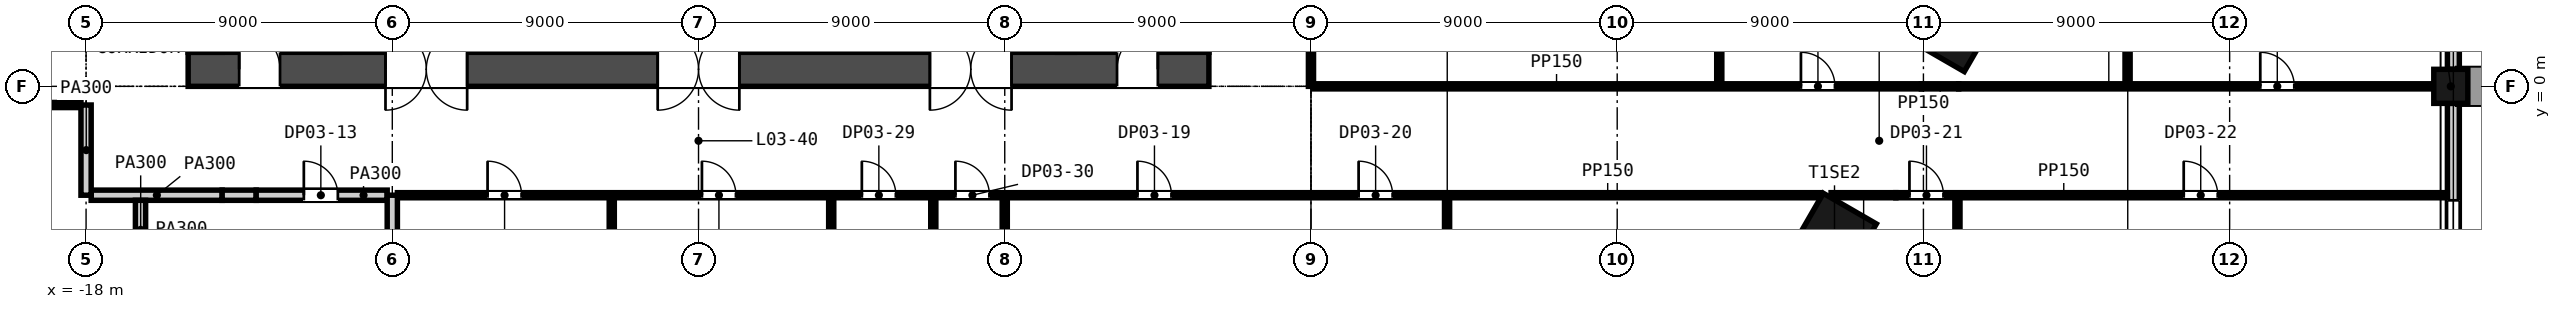
"""IFC4 building model, lengths in metres.
Left out: names, types, materials, properties, quantities, classifications, styles, units other than length and angle.
Written with IfcOpenShell. Run it as: python <this file> out.ifc"""

import sys

from ifc_helpers import new_model, si_unit, direction, frame, frame_2d, origin, origin_2d, place, context, subcontext, project, spatial, rectangle, extrude, element, fill, save


model = new_model("IFC4")
c1 = context("Model", 3, precision=1e-05, world=origin(), true_north=direction((0.0, 1.0)))
c2 = subcontext(c1, "Body", "Model", "MODEL_VIEW")
j1 = project(units=[si_unit("LENGTHUNIT", "METRE"), si_unit("PLANEANGLEUNIT", "RADIAN")], contexts=[c1])
p1 = place(None, origin())
s1 = spatial("IfcSite", under=j1, at=p1, CompositionType="ELEMENT")
p2 = place(p1, origin())
s2 = spatial("IfcBuilding", under=s1, at=p2, CompositionType="ELEMENT")
p3 = place(p2, frame((0.0, 0.0, 22.5)))
s3 = spatial("IfcBuildingStorey", under=s2, at=p3, CompositionType="ELEMENT", Elevation=22.5)
p4 = place(p3, frame((-15.0, 0.5, -0.3), z_axis=(0.0, 0.0, 1.0), x_axis=(1.0, 0.0, 0.0)))
e1 = element("IfcWall", 1, at=p4, inside=s3, PredefinedType="SOLIDWALL", context=c2, shape_type="SweptSolid", body=[
    extrude(rectangle(XDim=30.0, YDim=1.0, at=frame_2d((15.0, 0.0))), origin(), (0.0, 0.0, 1.0), 4.5),
])
p5 = place(p4, frame((5.8, 0.0, 0.3)))
e2 = element("IfcOpeningElement", 2, at=p5, cuts=e1, PredefinedType="OPENING", context=c2, shape_type="SweptSolid", body=[
    extrude(rectangle(XDim=2.4, YDim=2.4, at=frame_2d((1.2, 1.2))), frame((0.0, 0.51, 0.0), z_axis=(0.0, -1.0, 0.0), x_axis=(1.0, 0.0, 0.0)), (0.0, 0.0, 1.0), 1.02),
])
p6 = place(p4, frame((13.8, 0.0, 0.3)))
e3 = element("IfcOpeningElement", 3, at=p6, cuts=e1, PredefinedType="OPENING", context=c2, shape_type="SweptSolid", body=[
    extrude(rectangle(XDim=2.4, YDim=2.4, at=frame_2d((1.2, 1.2))), frame((0.0, 0.51, 0.0), z_axis=(0.0, -1.0, 0.0), x_axis=(1.0, 0.0, 0.0)), (0.0, 0.0, 1.0), 1.02),
])
p7 = place(p4, frame((21.8, 0.0, 0.3)))
e4 = element("IfcOpeningElement", 4, at=p7, cuts=e1, PredefinedType="OPENING", context=c2, shape_type="SweptSolid", body=[
    extrude(rectangle(XDim=2.4, YDim=2.4, at=frame_2d((1.2, 1.2))), frame((0.0, 0.51, 0.0), z_axis=(0.0, -1.0, 0.0), x_axis=(1.0, 0.0, 0.0)), (0.0, 0.0, 1.0), 1.02),
])
p8 = place(p4, frame((1.5, 0.0, 0.3)))
e5 = element("IfcOpeningElement", 5, at=p8, cuts=e1, PredefinedType="OPENING", context=c2, shape_type="SweptSolid", body=[
    extrude(rectangle(XDim=1.2, YDim=2.1, at=frame_2d((0.6, 1.05))), frame((0.0, 0.51, 0.0), z_axis=(0.0, -1.0, 0.0), x_axis=(1.0, 0.0, 0.0)), (0.0, 0.0, 1.0), 1.02),
])
p9 = place(p4, frame((27.3, 0.0, 0.3)))
e6 = element("IfcOpeningElement", 6, at=p9, cuts=e1, PredefinedType="OPENING", context=c2, shape_type="SweptSolid", body=[
    extrude(rectangle(XDim=1.2, YDim=2.1, at=frame_2d((0.6, 1.05))), frame((0.0, 0.51, 0.0), z_axis=(0.0, -1.0, 0.0), x_axis=(1.0, 0.0, 0.0)), (0.0, 0.0, 1.0), 1.02),
])
for number, where, z_axis, x_axis in (
    (7, (33.387, -4.373, -0.3), (0.0, 0.0, 1.0), (0.5, 0.866, 0.0)),
    (8, (36.872, 1.663, -0.3), (0.0, 0.0, 1.0), (0.5, 0.866, 0.0)),
):
    element("IfcColumn", number, at=place(p3, frame(where, z_axis=z_axis, x_axis=x_axis)), inside=s3, PredefinedType="COLUMN", context=c2, shape_type="SweptSolid", body=[
        extrude(rectangle(XDim=1.8, YDim=1.8, at=origin_2d()), origin(), (0.0, 0.0, 1.0), 4.5),
    ])
p10 = place(p3, frame((51.5, 0.0, -0.3), z_axis=(0.0, 0.0, 1.0), x_axis=(0.0, 1.0, 0.0)))
e9 = element("IfcColumn", 9, at=p10, inside=s3, PredefinedType="COLUMN", context=c2, shape_type="SweptSolid", body=[
    extrude(rectangle(XDim=1.0, YDim=1.0, at=origin_2d()), origin(), (0.0, 0.0, 1.0), 4.5),
])
p11 = place(p3, frame((51.575, -8.2, -0.3), z_axis=(0.0, 0.0, 1.0), x_axis=(0.0, 1.0, 0.0)))
e10 = element("IfcWall", 10, at=p11, inside=s3, PredefinedType="SOLIDWALL", context=c2, shape_type="SweptSolid", body=[
    extrude(rectangle(XDim=7.7, YDim=0.35, at=frame_2d((3.85, 0.0))), origin(), (0.0, 0.0, 1.0), 3.6),
])
p12 = place(p11, frame((2.85, 0.0, 1.2)))
e11 = element("IfcOpeningElement", 11, at=p12, cuts=e10, PredefinedType="OPENING", context=c2, shape_type="SweptSolid", body=[
    extrude(rectangle(XDim=2.0, YDim=2.35, at=frame_2d((1.0, 1.175))), frame((0.0, 0.185, 0.0), z_axis=(0.0, -1.0, 0.0), x_axis=(1.0, 0.0, 0.0)), (0.0, 0.0, 1.0), 0.37),
])
p13 = place(p3, frame((51.575, 0.5, -0.3), z_axis=(0.0, 0.0, 1.0), x_axis=(0.0, 1.0, 0.0)))
e12 = element("IfcWall", 12, at=p13, inside=s3, PredefinedType="SOLIDWALL", context=c2, shape_type="SweptSolid", body=[
    extrude(rectangle(XDim=7.75, YDim=0.35, at=frame_2d((3.875, 0.0))), origin(), (0.0, 0.0, 1.0), 3.6),
])
p14 = place(p13, frame((2.875, 0.0, 1.2)))
e13 = element("IfcOpeningElement", 13, at=p14, cuts=e12, PredefinedType="OPENING", context=c2, shape_type="SweptSolid", body=[
    extrude(rectangle(XDim=2.0, YDim=2.35, at=frame_2d((1.0, 1.175))), frame((0.0, 0.185, 0.0), z_axis=(0.0, -1.0, 0.0), x_axis=(1.0, 0.0, 0.0)), (0.0, 0.0, 1.0), 0.37),
])
p15 = place(p3, frame((-17.85, -3.2, 0.0), z_axis=(0.0, 0.0, 1.0), x_axis=(1.0, 0.0, 0.0)))
e14 = element("IfcWall", 14, at=p15, inside=s3, PredefinedType="PARTITIONING", context=c2, shape_type="SweptSolid", body=[
    extrude(rectangle(XDim=3.85, YDim=0.3, at=frame_2d((1.925, 0.0))), origin(), (0.0, 0.0, 1.0), 4.2),
])
p16 = place(p3, frame((-14.0, -3.2, 0.0), z_axis=(0.0, 0.0, 1.0), x_axis=(1.0, 0.0, 0.0)))
e15 = element("IfcWall", 15, at=p16, inside=s3, PredefinedType="PARTITIONING", context=c2, shape_type="SweptSolid", body=[
    extrude(rectangle(XDim=1.0, YDim=0.3, at=frame_2d((0.5, 0.0))), origin(), (0.0, 0.0, 1.0), 3.451),
])
p17 = place(p3, frame((-13.0, -3.2, 0.0), z_axis=(0.0, 0.0, 1.0), x_axis=(1.0, 0.0, 0.0)))
e16 = element("IfcWall", 16, at=p17, inside=s3, PredefinedType="PARTITIONING", context=c2, shape_type="SweptSolid", body=[
    extrude(rectangle(XDim=3.85, YDim=0.3, at=frame_2d((1.925, 0.0))), origin(), (0.0, 0.0, 1.0), 4.2),
])
p18 = place(p17, frame((1.4, 0.0, 0.0)))
e17 = element("IfcOpeningElement", 17, at=p18, cuts=e16, PredefinedType="OPENING", context=c2, shape_type="SweptSolid", body=[
    extrude(rectangle(XDim=1.0, YDim=2.1, at=frame_2d((0.5, 1.05))), frame((0.0, 0.16, 0.0), z_axis=(0.0, -1.0, 0.0), x_axis=(1.0, 0.0, 0.0)), (0.0, 0.0, 1.0), 0.32),
])
p19 = place(p3, frame((-8.85, -3.2, 0.0), z_axis=(0.0, 0.0, 1.0), x_axis=(1.0, 0.0, 0.0)))
e18 = element("IfcWall", 18, at=p19, inside=s3, PredefinedType="PARTITIONING", context=c2, shape_type="SweptSolid", body=[
    extrude(rectangle(XDim=41.831, YDim=0.15, at=frame_2d((20.916, 0.0))), origin(), (0.0, 0.0, 1.0), 4.2),
])
p20 = place(p19, frame((21.75, 0.0, 0.0)))
e19 = element("IfcOpeningElement", 19, at=p20, cuts=e18, PredefinedType="OPENING", context=c2, shape_type="SweptSolid", body=[
    extrude(rectangle(XDim=1.0, YDim=2.1, at=frame_2d((0.5, 1.05))), frame((0.0, 0.085, 0.0), z_axis=(0.0, -1.0, 0.0), x_axis=(1.0, 0.0, 0.0)), (0.0, 0.0, 1.0), 0.17),
])
p21 = place(p19, frame((28.25, 0.0, 0.0)))
e20 = element("IfcOpeningElement", 20, at=p21, cuts=e18, PredefinedType="OPENING", context=c2, shape_type="SweptSolid", body=[
    extrude(rectangle(XDim=1.0, YDim=2.1, at=frame_2d((0.5, 1.05))), frame((0.0, 0.085, 0.0), z_axis=(0.0, -1.0, 0.0), x_axis=(1.0, 0.0, 0.0)), (0.0, 0.0, 1.0), 0.17),
])
p22 = place(p19, frame((2.65, 0.0, 0.0)))
e21 = element("IfcOpeningElement", 21, at=p22, cuts=e18, PredefinedType="OPENING", context=c2, shape_type="SweptSolid", body=[
    extrude(rectangle(XDim=1.0, YDim=2.1, at=frame_2d((0.5, 1.05))), frame((0.0, 0.085, 0.0), z_axis=(0.0, -1.0, 0.0), x_axis=(1.0, 0.0, 0.0)), (0.0, 0.0, 1.0), 0.17),
])
p23 = place(p19, frame((8.95, 0.0, 0.0)))
e22 = element("IfcOpeningElement", 22, at=p23, cuts=e18, PredefinedType="OPENING", context=c2, shape_type="SweptSolid", body=[
    extrude(rectangle(XDim=1.0, YDim=2.1, at=frame_2d((0.5, 1.05))), frame((0.0, 0.085, 0.0), z_axis=(0.0, -1.0, 0.0), x_axis=(1.0, 0.0, 0.0)), (0.0, 0.0, 1.0), 0.17),
])
p24 = place(p19, frame((13.65, 0.0, 0.0)))
e23 = element("IfcOpeningElement", 23, at=p24, cuts=e18, PredefinedType="OPENING", context=c2, shape_type="SweptSolid", body=[
    extrude(rectangle(XDim=1.0, YDim=2.1, at=frame_2d((0.5, 1.05))), frame((0.0, 0.085, 0.0), z_axis=(0.0, -1.0, 0.0), x_axis=(1.0, 0.0, 0.0)), (0.0, 0.0, 1.0), 0.17),
])
p25 = place(p19, frame((16.4, 0.0, 0.0)))
e24 = element("IfcOpeningElement", 24, at=p25, cuts=e18, PredefinedType="OPENING", context=c2, shape_type="SweptSolid", body=[
    extrude(rectangle(XDim=1.0, YDim=2.1, at=frame_2d((0.5, 1.05))), frame((0.0, 0.085, 0.0), z_axis=(0.0, -1.0, 0.0), x_axis=(1.0, 0.0, 0.0)), (0.0, 0.0, 1.0), 0.17),
])
p26 = place(p3, frame((33.286, -3.2, 0.0), z_axis=(0.0, 0.0, 1.0), x_axis=(1.0, 0.0, 0.0)))
e25 = element("IfcWall", 25, at=p26, inside=s3, PredefinedType="PARTITIONING", context=c2, shape_type="SweptSolid", body=[
    extrude(rectangle(XDim=1.904, YDim=0.15, at=frame_2d((0.952, 0.0))), origin(), (0.0, 0.0, 1.0), 3.2),
])
p27 = place(p3, frame((35.189, -3.2, 0.0), z_axis=(0.0, 0.0, 1.0), x_axis=(1.0, 0.0, 0.0)))
e26 = element("IfcWall", 26, at=p27, inside=s3, PredefinedType="PARTITIONING", context=c2, shape_type="SweptSolid", body=[
    extrude(rectangle(XDim=16.21, YDim=0.15, at=frame_2d((8.105, 0.0))), origin(), (0.0, 0.0, 1.0), 4.2),
])
p28 = place(p27, frame((0.4, 0.0, 0.0)))
e27 = element("IfcOpeningElement", 27, at=p28, cuts=e26, PredefinedType="OPENING", context=c2, shape_type="SweptSolid", body=[
    extrude(rectangle(XDim=1.0, YDim=2.1, at=frame_2d((0.5, 1.05))), frame((0.0, 0.085, 0.0), z_axis=(0.0, -1.0, 0.0), x_axis=(1.0, 0.0, 0.0)), (0.0, 0.0, 1.0), 0.17),
])
p29 = place(p27, frame((8.46, 0.0, 0.0)))
e28 = element("IfcOpeningElement", 28, at=p29, cuts=e26, PredefinedType="OPENING", context=c2, shape_type="SweptSolid", body=[
    extrude(rectangle(XDim=1.0, YDim=2.1, at=frame_2d((0.5, 1.05))), frame((0.0, 0.085, 0.0), z_axis=(0.0, -1.0, 0.0), x_axis=(1.0, 0.0, 0.0)), (0.0, 0.0, 1.0), 0.17),
])
p30 = place(p3, frame((-23.923, -0.549, 0.0), z_axis=(0.0, 0.0, 1.0), x_axis=(1.0, 0.0, 0.0)))
e29 = element("IfcWall", 29, at=p30, inside=s3, PredefinedType="PARTITIONING", context=c2, shape_type="SweptSolid", body=[
    extrude(rectangle(XDim=5.773, YDim=0.15, at=frame_2d((2.886, 0.0))), origin(), (0.0, 0.0, 1.0), 3.521),
])
p31 = place(p30, frame((2.673, 0.0, 0.0)))
e30 = element("IfcOpeningElement", 30, at=p31, cuts=e29, PredefinedType="OPENING", context=c2, shape_type="SweptSolid", body=[
    extrude(rectangle(XDim=1.0, YDim=2.1, at=frame_2d((0.5, 1.05))), frame((0.0, 0.085, 0.0), z_axis=(0.0, -1.0, 0.0), x_axis=(1.0, 0.0, 0.0)), (0.0, 0.0, 1.0), 0.17),
])
p32 = place(p3, frame((18.075, 0.0, 0.0), z_axis=(0.0, 0.0, 1.0), x_axis=(1.0, 0.0, 0.0)))
e31 = element("IfcWall", 31, at=p32, inside=s3, PredefinedType="PARTITIONING", context=c2, shape_type="SweptSolid", body=[
    extrude(rectangle(XDim=17.865, YDim=0.15, at=frame_2d((8.933, 0.0))), origin(), (0.0, 0.0, 1.0), 4.2),
])
p33 = place(p32, frame((14.325, 0.0, 0.0)))
e32 = element("IfcOpeningElement", 32, at=p33, cuts=e31, PredefinedType="OPENING", context=c2, shape_type="SweptSolid", body=[
    extrude(rectangle(XDim=1.0, YDim=2.1, at=frame_2d((0.5, 1.05))), frame((0.0, 0.085, 0.0), z_axis=(0.0, -1.0, 0.0), x_axis=(1.0, 0.0, 0.0)), (0.0, 0.0, 1.0), 0.17),
])
p34 = place(p3, frame((35.94, 0.0, 0.0), z_axis=(0.0, 0.0, 1.0), x_axis=(1.0, 0.0, 0.0)))
e33 = element("IfcWall", 33, at=p34, inside=s3, PredefinedType="PARTITIONING", context=c2, shape_type="SweptSolid", body=[
    extrude(rectangle(XDim=1.097, YDim=0.15, at=frame_2d((0.548, 0.0))), origin(), (0.0, 0.0, 1.0), 3.2),
])
p35 = place(p3, frame((37.037, 0.0, 0.0), z_axis=(0.0, 0.0, 1.0), x_axis=(1.0, 0.0, 0.0)))
e34 = element("IfcWall", 34, at=p35, inside=s3, PredefinedType="PARTITIONING", context=c2, shape_type="SweptSolid", body=[
    extrude(rectangle(XDim=13.963, YDim=0.15, at=frame_2d((6.981, 0.0))), origin(), (0.0, 0.0, 1.0), 4.2),
])
p36 = place(p35, frame((8.863, 0.0, 0.0)))
e35 = element("IfcOpeningElement", 35, at=p36, cuts=e34, PredefinedType="OPENING", context=c2, shape_type="SweptSolid", body=[
    extrude(rectangle(XDim=1.0, YDim=2.1, at=frame_2d((0.5, 1.05))), frame((0.0, 0.085, 0.0), z_axis=(0.0, -1.0, 0.0), x_axis=(1.0, 0.0, 0.0)), (0.0, 0.0, 1.0), 0.17),
])
p37 = place(p3, frame((-18.0, -3.2, 0.0), z_axis=(0.0, 0.0, 1.0), x_axis=(0.0, 1.0, 0.0)))
e36 = element("IfcWall", 36, at=p37, inside=s3, PredefinedType="PARTITIONING", context=c2, shape_type="SweptSolid", body=[
    extrude(rectangle(XDim=2.651, YDim=0.3, at=frame_2d((1.326, 0.0))), origin(), (0.0, 0.0, 1.0), 4.2),
])
p38 = place(p3, frame((-16.4, -5.084, 0.0), z_axis=(0.0, 0.0, 1.0), x_axis=(0.0, 1.0, 0.0)))
e37 = element("IfcWall", 37, at=p38, inside=s3, PredefinedType="PARTITIONING", context=c2, shape_type="SweptSolid", body=[
    extrude(rectangle(XDim=1.734, YDim=0.3, at=frame_2d((0.867, 0.0))), origin(), (0.0, 0.0, 1.0), 4.2),
])
p39 = place(p3, frame((-9.0, -9.0, 0.0), z_axis=(0.0, 0.0, 1.0), x_axis=(0.0, 1.0, 0.0)))
e38 = element("IfcWall", 38, at=p39, inside=s3, PredefinedType="PARTITIONING", context=c2, shape_type="SweptSolid", body=[
    extrude(rectangle(XDim=5.8, YDim=0.3, at=frame_2d((2.9, 0.0))), origin(), (0.0, 0.0, 1.0), 4.2),
])
for number, where, z_axis, x_axis in (
    (39, (-2.55, -9.0, 0.0), (0.0, 0.0, 1.0), (0.0, 1.0, 0.0)),
    (40, (3.9, -9.0, 0.0), (0.0, 0.0, 1.0), (0.0, 1.0, 0.0)),
    (41, (6.9, -9.0, 0.0), (0.0, 0.0, 1.0), (0.0, 1.0, 0.0)),
    (42, (9.0, -9.0, 0.0), (0.0, 0.0, 1.0), (0.0, 1.0, 0.0)),
):
    element("IfcWall", number, at=place(p3, frame(where, z_axis=z_axis, x_axis=x_axis)), inside=s3, PredefinedType="PARTITIONING", context=c2, shape_type="SweptSolid", body=[
        extrude(rectangle(XDim=5.725, YDim=0.15, at=frame_2d((2.863, 0.0))), origin(), (0.0, 0.0, 1.0), 4.2),
    ])
p40 = place(p3, frame((18.0, 0.0, 0.0), z_axis=(0.0, 0.0, 1.0), x_axis=(0.0, 1.0, 0.0)))
e43 = element("IfcWall", 43, at=p40, inside=s3, PredefinedType="PARTITIONING", context=c2, shape_type="SweptSolid", body=[
    extrude(rectangle(XDim=14.25, YDim=0.15, at=frame_2d((7.125, 0.0))), origin(), (0.0, 0.0, 1.0), 4.2),
])
p41 = place(p40, frame((6.65, 0.0, 0.0)))
e44 = element("IfcOpeningElement", 44, at=p41, cuts=e43, PredefinedType="OPENING", context=c2, shape_type="SweptSolid", body=[
    extrude(rectangle(XDim=1.0, YDim=2.1, at=frame_2d((0.5, 1.05))), frame((0.0, 0.085, 0.0), z_axis=(0.0, -1.0, 0.0), x_axis=(1.0, 0.0, 0.0)), (0.0, 0.0, 1.0), 0.17),
])
p42 = place(p3, frame((22.0, -16.643, 0.0), z_axis=(0.0, 0.0, 1.0), x_axis=(0.0, 1.0, 0.0)))
e45 = element("IfcWall", 45, at=p42, inside=s3, PredefinedType="PARTITIONING", context=c2, shape_type="SweptSolid", body=[
    extrude(rectangle(XDim=13.368, YDim=0.15, at=frame_2d((6.684, 0.0))), origin(), (0.0, 0.0, 1.0), 4.2),
])
p43 = place(p3, frame((30.0, 0.075, 0.0), z_axis=(0.0, 0.0, 1.0), x_axis=(0.0, 1.0, 0.0)))
e46 = element("IfcWall", 46, at=p43, inside=s3, PredefinedType="PARTITIONING", context=c2, shape_type="SweptSolid", body=[
    extrude(rectangle(XDim=12.077, YDim=0.15, at=frame_2d((6.039, 0.0))), origin(), (0.0, 0.0, 1.0), 4.2),
])
p44 = place(p3, frame((37.0, -16.643, 0.0), z_axis=(0.0, 0.0, 1.0), x_axis=(0.0, 1.0, 0.0)))
e47 = element("IfcWall", 47, at=p44, inside=s3, PredefinedType="PARTITIONING", context=c2, shape_type="SweptSolid", body=[
    extrude(rectangle(XDim=13.368, YDim=0.15, at=frame_2d((6.684, 0.0))), origin(), (0.0, 0.0, 1.0), 4.2),
])
p45 = place(p3, frame((42.0, 0.075, 0.0), z_axis=(0.0, 0.0, 1.0), x_axis=(0.0, 1.0, 0.0)))
e48 = element("IfcWall", 48, at=p45, inside=s3, PredefinedType="PARTITIONING", context=c2, shape_type="SweptSolid", body=[
    extrude(rectangle(XDim=14.1, YDim=0.15, at=frame_2d((7.05, 0.0))), origin(), (0.0, 0.0, 1.0), 4.2),
])
p46 = place(p12, origin())
e49 = element("IfcWindow", 49, at=p46, inside=s3, PartitioningType="SINGLE_PANEL", PredefinedType="WINDOW", context=c2, shape_type="SweptSolid", body=[
    extrude(rectangle(XDim=2.0, YDim=2.35, at=frame_2d((1.0, 1.175))), frame((0.0, 0.03, 0.0), z_axis=(0.0, -1.0, 0.0), x_axis=(1.0, 0.0, 0.0)), (0.0, 0.0, 1.0), 0.06),
])
fill(e11, e49)
p47 = place(p5, origin())
e50 = element("IfcDoor", 50, at=p47, inside=s3, OperationType="DOUBLE_DOOR_DOUBLE_SWING", PredefinedType="DOOR", context=c2, shape_type="SweptSolid", body=[
    extrude(rectangle(XDim=2.4, YDim=2.4, at=frame_2d((1.2, 1.2))), frame((0.0, 0.025, 0.0), z_axis=(0.0, -1.0, 0.0), x_axis=(1.0, 0.0, 0.0)), (0.0, 0.0, 1.0), 0.05),
])
fill(e2, e50)
p48 = place(p6, origin())
e51 = element("IfcDoor", 51, at=p48, inside=s3, OperationType="DOUBLE_DOOR_DOUBLE_SWING", PredefinedType="DOOR", context=c2, shape_type="SweptSolid", body=[
    extrude(rectangle(XDim=2.4, YDim=2.4, at=frame_2d((1.2, 1.2))), frame((0.0, 0.025, 0.0), z_axis=(0.0, -1.0, 0.0), x_axis=(1.0, 0.0, 0.0)), (0.0, 0.0, 1.0), 0.05),
])
fill(e3, e51)
p49 = place(p7, origin())
e52 = element("IfcDoor", 52, at=p49, inside=s3, OperationType="DOUBLE_DOOR_DOUBLE_SWING", PredefinedType="DOOR", context=c2, shape_type="SweptSolid", body=[
    extrude(rectangle(XDim=2.4, YDim=2.4, at=frame_2d((1.2, 1.2))), frame((0.0, 0.025, 0.0), z_axis=(0.0, -1.0, 0.0), x_axis=(1.0, 0.0, 0.0)), (0.0, 0.0, 1.0), 0.05),
])
fill(e4, e52)
p50 = place(p8, origin())
e53 = element("IfcDoor", 53, at=p50, inside=s3, OperationType="SINGLE_SWING_LEFT", PredefinedType="DOOR", context=c2, shape_type="SweptSolid", body=[
    extrude(rectangle(XDim=1.2, YDim=2.1, at=frame_2d((0.6, 1.05))), frame((0.0, 0.025, 0.0), z_axis=(0.0, -1.0, 0.0), x_axis=(1.0, 0.0, 0.0)), (0.0, 0.0, 1.0), 0.05),
])
fill(e5, e53)
p51 = place(p9, origin())
e54 = element("IfcDoor", 54, at=p51, inside=s3, OperationType="SINGLE_SWING_RIGHT", PredefinedType="DOOR", context=c2, shape_type="SweptSolid", body=[
    extrude(rectangle(XDim=1.2, YDim=2.1, at=frame_2d((0.6, 1.05))), frame((0.0, 0.025, 0.0), z_axis=(0.0, -1.0, 0.0), x_axis=(1.0, 0.0, 0.0)), (0.0, 0.0, 1.0), 0.05),
])
fill(e6, e54)
p52 = place(p18, origin())
e55 = element("IfcDoor", 55, at=p52, inside=s3, OperationType="SINGLE_SWING_LEFT", PredefinedType="DOOR", context=c2, shape_type="SweptSolid", body=[
    extrude(rectangle(XDim=1.0, YDim=2.1, at=frame_2d((0.5, 1.05))), frame((0.0, 0.025, 0.0), z_axis=(0.0, -1.0, 0.0), x_axis=(1.0, 0.0, 0.0)), (0.0, 0.0, 1.0), 0.05),
])
fill(e17, e55)
p53 = place(p20, origin())
e56 = element("IfcDoor", 56, at=p53, inside=s3, OperationType="SINGLE_SWING_LEFT", PredefinedType="DOOR", context=c2, shape_type="SweptSolid", body=[
    extrude(rectangle(XDim=1.0, YDim=2.1, at=frame_2d((0.5, 1.05))), frame((0.0, 0.025, 0.0), z_axis=(0.0, -1.0, 0.0), x_axis=(1.0, 0.0, 0.0)), (0.0, 0.0, 1.0), 0.05),
])
fill(e19, e56)
p54 = place(p21, origin())
e57 = element("IfcDoor", 57, at=p54, inside=s3, OperationType="SINGLE_SWING_LEFT", PredefinedType="DOOR", context=c2, shape_type="SweptSolid", body=[
    extrude(rectangle(XDim=1.0, YDim=2.1, at=frame_2d((0.5, 1.05))), frame((0.0, 0.025, 0.0), z_axis=(0.0, -1.0, 0.0), x_axis=(1.0, 0.0, 0.0)), (0.0, 0.0, 1.0), 0.05),
])
fill(e20, e57)
p55 = place(p28, origin())
e58 = element("IfcDoor", 58, at=p55, inside=s3, OperationType="SINGLE_SWING_LEFT", PredefinedType="DOOR", context=c2, shape_type="SweptSolid", body=[
    extrude(rectangle(XDim=1.0, YDim=2.1, at=frame_2d((0.5, 1.05))), frame((0.0, 0.025, 0.0), z_axis=(0.0, -1.0, 0.0), x_axis=(1.0, 0.0, 0.0)), (0.0, 0.0, 1.0), 0.05),
])
fill(e27, e58)
p56 = place(p29, origin())
e59 = element("IfcDoor", 59, at=p56, inside=s3, OperationType="SINGLE_SWING_LEFT", PredefinedType="DOOR", context=c2, shape_type="SweptSolid", body=[
    extrude(rectangle(XDim=1.0, YDim=2.1, at=frame_2d((0.5, 1.05))), frame((0.0, 0.025, 0.0), z_axis=(0.0, -1.0, 0.0), x_axis=(1.0, 0.0, 0.0)), (0.0, 0.0, 1.0), 0.05),
])
fill(e28, e59)
p57 = place(p22, origin())
e60 = element("IfcDoor", 60, at=p57, inside=s3, OperationType="SINGLE_SWING_LEFT", PredefinedType="DOOR", context=c2, shape_type="SweptSolid", body=[
    extrude(rectangle(XDim=1.0, YDim=2.1, at=frame_2d((0.5, 1.05))), frame((0.0, 0.025, 0.0), z_axis=(0.0, -1.0, 0.0), x_axis=(1.0, 0.0, 0.0)), (0.0, 0.0, 1.0), 0.05),
])
fill(e21, e60)
p58 = place(p23, origin())
e61 = element("IfcDoor", 61, at=p58, inside=s3, OperationType="SINGLE_SWING_LEFT", PredefinedType="DOOR", context=c2, shape_type="SweptSolid", body=[
    extrude(rectangle(XDim=1.0, YDim=2.1, at=frame_2d((0.5, 1.05))), frame((0.0, 0.025, 0.0), z_axis=(0.0, -1.0, 0.0), x_axis=(1.0, 0.0, 0.0)), (0.0, 0.0, 1.0), 0.05),
])
fill(e22, e61)
p59 = place(p24, origin())
e62 = element("IfcDoor", 62, at=p59, inside=s3, OperationType="SINGLE_SWING_LEFT", PredefinedType="DOOR", context=c2, shape_type="SweptSolid", body=[
    extrude(rectangle(XDim=1.0, YDim=2.1, at=frame_2d((0.5, 1.05))), frame((0.0, 0.025, 0.0), z_axis=(0.0, -1.0, 0.0), x_axis=(1.0, 0.0, 0.0)), (0.0, 0.0, 1.0), 0.05),
])
fill(e23, e62)
p60 = place(p25, origin())
e63 = element("IfcDoor", 63, at=p60, inside=s3, OperationType="SINGLE_SWING_LEFT", PredefinedType="DOOR", context=c2, shape_type="SweptSolid", body=[
    extrude(rectangle(XDim=1.0, YDim=2.1, at=frame_2d((0.5, 1.05))), frame((0.0, 0.025, 0.0), z_axis=(0.0, -1.0, 0.0), x_axis=(1.0, 0.0, 0.0)), (0.0, 0.0, 1.0), 0.05),
])
fill(e24, e63)
p61 = place(p33, origin())
e64 = element("IfcDoor", 64, at=p61, inside=s3, OperationType="SINGLE_SWING_LEFT", PredefinedType="DOOR", context=c2, shape_type="SweptSolid", body=[
    extrude(rectangle(XDim=1.0, YDim=2.1, at=frame_2d((0.5, 1.05))), frame((0.0, 0.025, 0.0), z_axis=(0.0, -1.0, 0.0), x_axis=(1.0, 0.0, 0.0)), (0.0, 0.0, 1.0), 0.05),
])
fill(e32, e64)
p62 = place(p36, origin())
e65 = element("IfcDoor", 65, at=p62, inside=s3, OperationType="SINGLE_SWING_LEFT", PredefinedType="DOOR", context=c2, shape_type="SweptSolid", body=[
    extrude(rectangle(XDim=1.0, YDim=2.1, at=frame_2d((0.5, 1.05))), frame((0.0, 0.025, 0.0), z_axis=(0.0, -1.0, 0.0), x_axis=(1.0, 0.0, 0.0)), (0.0, 0.0, 1.0), 0.05),
])
fill(e35, e65)
save(model, sys.argv[1])
